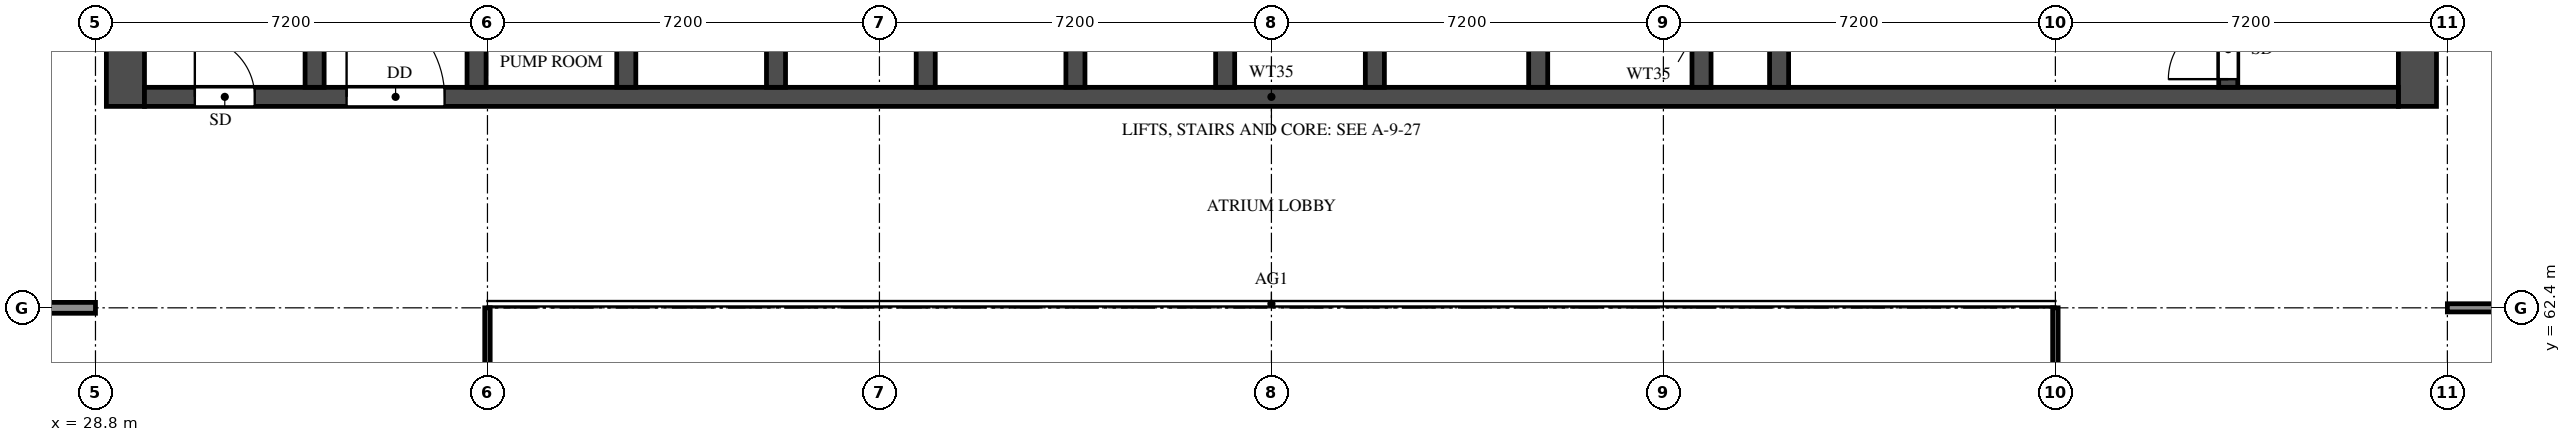
"""IFC4 building model, lengths in metres.
Left out: names, types, materials, properties, quantities, classifications, styles, units other than length and angle.
Written with IfcOpenShell. Run it as: python <this file> out.ifc"""

import sys

from ifc_helpers import new_model, si_unit, direction, frame, frame_2d, origin, place, context, subcontext, project, spatial, rectangle, extrude, element, fill, save


model = new_model("IFC4")
c1 = context("Model", 3, precision=1e-05, world=origin(), true_north=direction((0.0, 1.0)))
c2 = subcontext(c1, "Body", "Model", "MODEL_VIEW")
j1 = project(units=[si_unit("LENGTHUNIT", "METRE"), si_unit("PLANEANGLEUNIT", "RADIAN")], contexts=[c1])
p1 = place(None, origin())
s1 = spatial("IfcSite", under=j1, at=p1, CompositionType="ELEMENT")
p2 = place(p1, origin())
s2 = spatial("IfcBuilding", under=s1, at=p2, CompositionType="ELEMENT")
p3 = place(p2, frame((0.0, 0.0, 206.0)))
s3 = spatial("IfcBuildingStorey", under=s2, at=p3, CompositionType="ELEMENT", Elevation=206.0)
for number, where, z_axis, x_axis in (
    (1, (29.35, 66.1, 0.0), (0.0, 0.0, 1.0), (0.0, 1.0, 0.0)),
    (2, (71.45, 66.1, 0.0), (0.0, 0.0, 1.0), (0.0, 1.0, 0.0)),
):
    element("IfcWall", number, at=place(p3, frame(where, z_axis=z_axis, x_axis=x_axis)), inside=s3, PredefinedType="SHEAR", context=c2, shape_type="SweptSolid", body=[
        extrude(rectangle(XDim=11.9, YDim=0.7, at=frame_2d((5.95, 0.0))), origin(), (0.0, 0.0, 1.0), 5.22),
    ])
p4 = place(p3, frame((29.7, 66.275, 0.0), z_axis=(0.0, 0.0, 1.0), x_axis=(1.0, 0.0, 0.0)))
e3 = element("IfcWall", 3, at=p4, inside=s3, PredefinedType="SHEAR", context=c2, shape_type="SweptSolid", body=[
    extrude(rectangle(XDim=41.4, YDim=0.35, at=frame_2d((20.7, 0.0))), origin(), (0.0, 0.0, 1.0), 5.22),
])
p5 = place(p4, frame((0.925, 0.0, 0.0)))
e4 = element("IfcOpeningElement", 4, at=p5, cuts=e3, PredefinedType="OPENING", context=c2, shape_type="SweptSolid", body=[
    extrude(rectangle(XDim=1.1, YDim=2.1, at=frame_2d((0.55, 1.05))), frame((0.0, 0.185, 0.0), z_axis=(0.0, -1.0, 0.0), x_axis=(1.0, 0.0, 0.0)), (0.0, 0.0, 1.0), 0.37),
])
p6 = place(p4, frame((3.712, 0.0, 0.0)))
e5 = element("IfcOpeningElement", 5, at=p6, cuts=e3, PredefinedType="OPENING", context=c2, shape_type="SweptSolid", body=[
    extrude(rectangle(XDim=1.8, YDim=2.1, at=frame_2d((0.9, 1.05))), frame((0.0, 0.185, 0.0), z_axis=(0.0, -1.0, 0.0), x_axis=(1.0, 0.0, 0.0)), (0.0, 0.0, 1.0), 0.37),
])
p7 = place(p3, frame((32.825, 66.45, 0.0), z_axis=(0.0, 0.0, 1.0), x_axis=(0.0, 1.0, 0.0)))
e6 = element("IfcWall", 6, at=p7, inside=s3, PredefinedType="SHEAR", context=c2, shape_type="SweptSolid", body=[
    extrude(rectangle(XDim=10.85, YDim=0.35, at=frame_2d((5.425, 0.0))), origin(), (0.0, 0.0, 1.0), 5.22),
])
p8 = place(p3, frame((67.975, 66.45, 0.0), z_axis=(0.0, 0.0, 1.0), x_axis=(0.0, 1.0, 0.0)))
e7 = element("IfcWall", 7, at=p8, inside=s3, PredefinedType="SHEAR", context=c2, shape_type="SweptSolid", body=[
    extrude(rectangle(XDim=10.85, YDim=0.35, at=frame_2d((5.425, 0.0))), origin(), (0.0, 0.0, 1.0), 5.22),
])
p9 = place(p8, frame((0.15, 0.0, 0.0)))
e8 = element("IfcOpeningElement", 8, at=p9, cuts=e7, PredefinedType="OPENING", context=c2, shape_type="SweptSolid", body=[
    extrude(rectangle(XDim=1.1, YDim=2.1, at=frame_2d((0.55, 1.05))), frame((0.0, 0.185, 0.0), z_axis=(0.0, -1.0, 0.0), x_axis=(1.0, 0.0, 0.0)), (0.0, 0.0, 1.0), 0.37),
])
p10 = place(p3, frame((59.725, 66.45, 0.0), z_axis=(0.0, 0.0, 1.0), x_axis=(0.0, 1.0, 0.0)))
e9 = element("IfcWall", 9, at=p10, inside=s3, PredefinedType="SHEAR", context=c2, shape_type="SweptSolid", body=[
    extrude(rectangle(XDim=6.125, YDim=0.35, at=frame_2d((3.062, 0.0))), origin(), (0.0, 0.0, 1.0), 5.22),
])
p11 = place(p10, frame((3.85, 0.0, 0.0)))
e10 = element("IfcOpeningElement", 10, at=p11, cuts=e9, PredefinedType="OPENING", context=c2, shape_type="SweptSolid", body=[
    extrude(rectangle(XDim=1.2, YDim=2.1, at=frame_2d((0.6, 1.05))), frame((0.0, 0.185, 0.0), z_axis=(0.0, -1.0, 0.0), x_axis=(1.0, 0.0, 0.0)), (0.0, 0.0, 1.0), 0.37),
])
for number, where, z_axis, x_axis in (
    (11, (35.8, 66.45, 0.0), (0.0, 0.0, 1.0), (0.0, 1.0, 0.0)),
    (12, (38.55, 66.45, 0.0), (0.0, 0.0, 1.0), (0.0, 1.0, 0.0)),
    (13, (41.3, 66.45, 0.0), (0.0, 0.0, 1.0), (0.0, 1.0, 0.0)),
    (14, (44.05, 66.45, 0.0), (0.0, 0.0, 1.0), (0.0, 1.0, 0.0)),
    (15, (46.8, 66.45, 0.0), (0.0, 0.0, 1.0), (0.0, 1.0, 0.0)),
    (16, (49.55, 66.45, 0.0), (0.0, 0.0, 1.0), (0.0, 1.0, 0.0)),
    (17, (52.3, 66.45, 0.0), (0.0, 0.0, 1.0), (0.0, 1.0, 0.0)),
    (18, (55.3, 66.45, 0.0), (0.0, 0.0, 1.0), (0.0, 1.0, 0.0)),
    (19, (58.3, 66.45, 0.0), (0.0, 0.0, 1.0), (0.0, 1.0, 0.0)),
):
    element("IfcWall", number, at=place(p3, frame(where, z_axis=z_axis, x_axis=x_axis)), inside=s3, PredefinedType="SHEAR", context=c2, shape_type="SweptSolid", body=[
        extrude(rectangle(XDim=2.425, YDim=0.35, at=frame_2d((1.212, 0.0))), origin(), (0.0, 0.0, 1.0), 5.22),
    ])
p12 = place(p3, frame((72.0, 62.4, 0.0), z_axis=(0.0, 0.0, 1.0), x_axis=(1.0, 0.0, 0.0)))
e20 = element("IfcWall", 20, at=p12, inside=s3, PredefinedType="PARTITIONING", context=c2, shape_type="SweptSolid", body=[
    extrude(rectangle(XDim=13.35, YDim=0.15, at=frame_2d((6.675, 0.0))), origin(), (0.0, 0.0, 1.0), 3.72),
])
p13 = place(p12, frame((5.5, 0.0, 0.0)))
e21 = element("IfcOpeningElement", 21, at=p13, cuts=e20, PredefinedType="OPENING", context=c2, shape_type="SweptSolid", body=[
    extrude(rectangle(XDim=1.1, YDim=2.1, at=frame_2d((0.55, 1.05))), frame((0.0, 0.085, 0.0), z_axis=(0.0, -1.0, 0.0), x_axis=(1.0, 0.0, 0.0)), (0.0, 0.0, 1.0), 0.17),
])
p14 = place(p3, frame((15.45, 62.4, 0.0), z_axis=(0.0, 0.0, 1.0), x_axis=(1.0, 0.0, 0.0)))
e22 = element("IfcWall", 22, at=p14, inside=s3, PredefinedType="SOLIDWALL", context=c2, shape_type="SweptSolid", body=[
    extrude(rectangle(XDim=13.35, YDim=0.2, at=frame_2d((6.675, 0.0))), origin(), (0.0, 0.0, 1.0), 3.72),
])
p15 = place(p14, frame((6.75, 0.0, 0.0)))
e23 = element("IfcOpeningElement", 23, at=p15, cuts=e22, PredefinedType="OPENING", context=c2, shape_type="SweptSolid", body=[
    extrude(rectangle(XDim=1.1, YDim=2.1, at=frame_2d((0.55, 1.05))), frame((0.0, 0.11, 0.0), z_axis=(0.0, -1.0, 0.0), x_axis=(1.0, 0.0, 0.0)), (0.0, 0.0, 1.0), 0.22),
])
for number, where, z_axis, x_axis in (
    (24, (36.0, 48.0, 0.0), (0.0, 0.0, 1.0), (0.0, 1.0, 0.0)),
    (25, (64.8, 48.0, 0.0), (0.0, 0.0, 1.0), (0.0, 1.0, 0.0)),
):
    element("IfcWall", number, at=place(p3, frame(where, z_axis=z_axis, x_axis=x_axis)), inside=s3, PredefinedType="PARTITIONING", context=c2, shape_type="SweptSolid", body=[
        extrude(rectangle(XDim=14.4, YDim=0.1, at=frame_2d((7.2, 0.0))), origin(), (0.0, 0.0, 1.0), 4.32),
    ])
p16 = place(p5, origin())
e26 = element("IfcDoor", 26, at=p16, inside=s3, OperationType="SINGLE_SWING_LEFT", PredefinedType="DOOR", context=c2, shape_type="SweptSolid", body=[
    extrude(rectangle(XDim=1.1, YDim=2.1, at=frame_2d((0.55, 1.05))), frame((0.0, 0.025, 0.0), z_axis=(0.0, -1.0, 0.0), x_axis=(1.0, 0.0, 0.0)), (0.0, 0.0, 1.0), 0.05),
])
fill(e4, e26)
p17 = place(p9, origin())
e27 = element("IfcDoor", 27, at=p17, inside=s3, OperationType="SINGLE_SWING_LEFT", PredefinedType="DOOR", context=c2, shape_type="SweptSolid", body=[
    extrude(rectangle(XDim=1.1, YDim=2.1, at=frame_2d((0.55, 1.05))), frame((0.0, 0.025, 0.0), z_axis=(0.0, -1.0, 0.0), x_axis=(1.0, 0.0, 0.0)), (0.0, 0.0, 1.0), 0.05),
])
fill(e8, e27)
p18 = place(p6, origin())
e28 = element("IfcDoor", 28, at=p18, inside=s3, OperationType="DOUBLE_DOOR_SINGLE_SWING", PredefinedType="DOOR", context=c2, shape_type="SweptSolid", body=[
    extrude(rectangle(XDim=1.8, YDim=2.1, at=frame_2d((0.9, 1.05))), frame((0.0, 0.025, 0.0), z_axis=(0.0, -1.0, 0.0), x_axis=(1.0, 0.0, 0.0)), (0.0, 0.0, 1.0), 0.05),
])
fill(e5, e28)
save(model, sys.argv[1])
